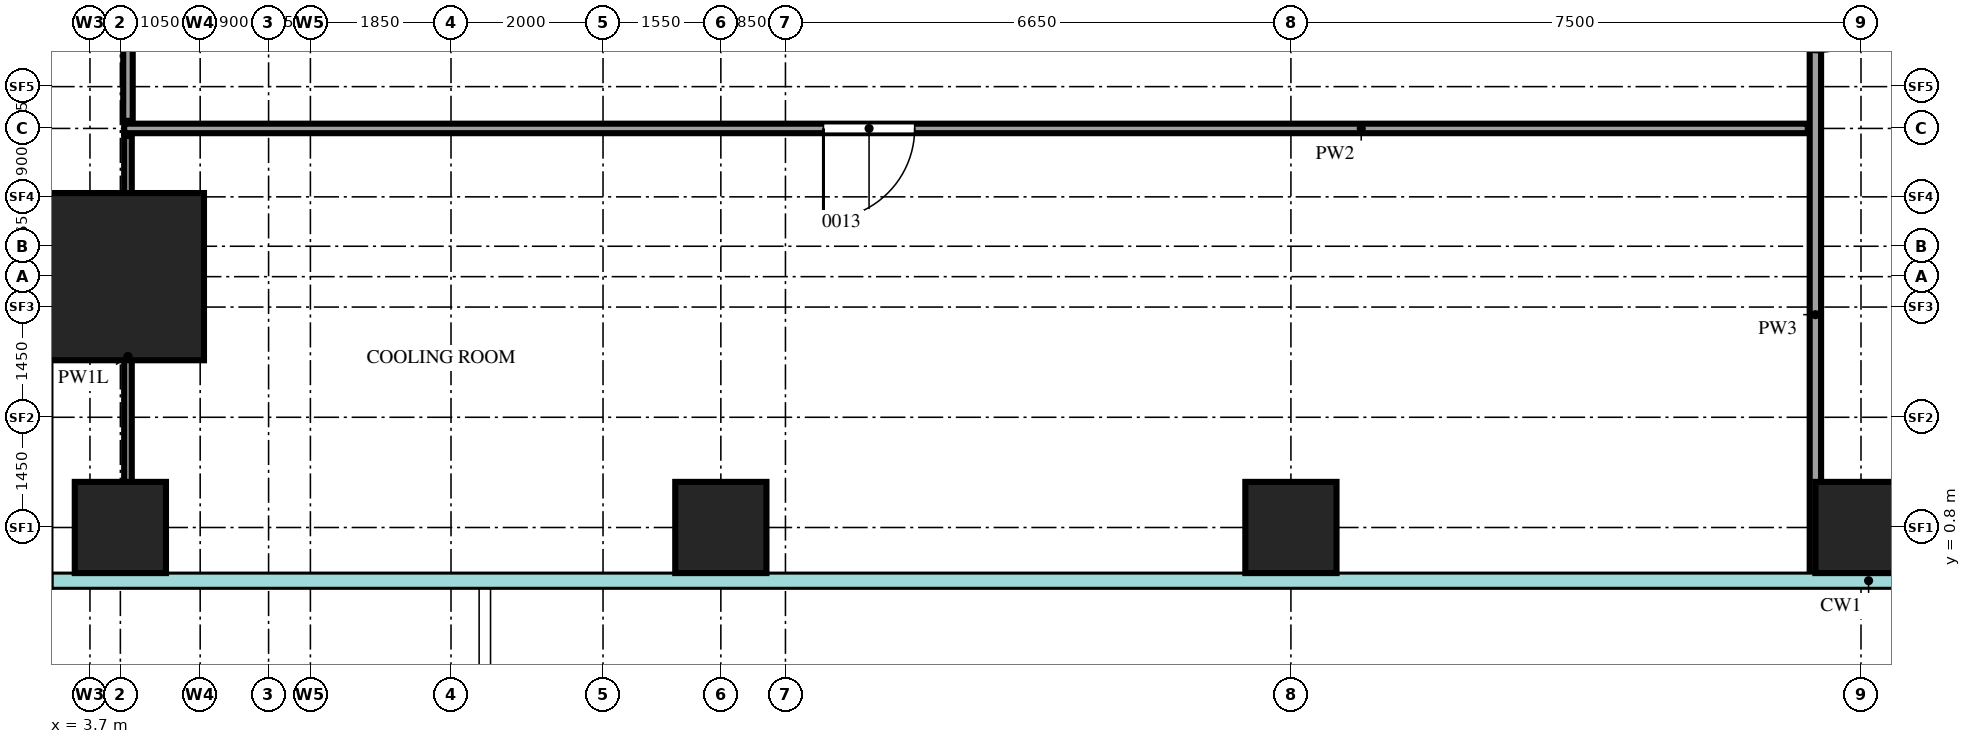
"""IFC4 building model, lengths in metres.
Left out: names, types, materials, properties, quantities, classifications, styles, units other than length and angle.
Written with IfcOpenShell. Run it as: python <this file> out.ifc"""

import sys

from ifc_helpers import new_model, si_unit, direction, frame, frame_2d, origin, origin_2d, place, context, subcontext, project, spatial, rectangle, extrude, source, transform, mapped, element, fill, save


model = new_model("IFC4")
c1 = context("Model", 3, precision=1e-05, world=origin(), true_north=direction((0.0, 1.0)))
c2 = subcontext(c1, "Body", "Model", "MODEL_VIEW")
j1 = project(units=[si_unit("LENGTHUNIT", "METRE"), si_unit("PLANEANGLEUNIT", "RADIAN")], contexts=[c1])
p1 = place(None, origin())
s1 = spatial("IfcSite", under=j1, at=p1, CompositionType="ELEMENT")
p2 = place(p1, origin())
s2 = spatial("IfcBuilding", under=s1, at=p2, CompositionType="ELEMENT")
p3 = place(p2, frame((0.0, 0.0, 78.0)))
s3 = spatial("IfcBuildingStorey", under=s2, at=p3, CompositionType="ELEMENT", Elevation=78.0)
m1 = source(origin(), c2, "Body", "SweptSolid", [
    extrude(rectangle(XDim=2.2, YDim=2.2, at=origin_2d()), origin(), (0.0, 0.0, 1.0), 4.5),
])
p4 = place(p3, frame((4.1, 4.1, 0.0), z_axis=(0.0, 0.0, 1.0), x_axis=(1.0, 0.0, 0.0)))
e1 = element("IfcColumn", 1, at=p4, inside=s3, PredefinedType="COLUMN", context=c2, shape_type="MappedRepresentation", body=[
    mapped(m1, transform((0.0, 0.0, 0.0))),
])
m2 = source(origin(), c2, "Body", "SweptSolid", [
    extrude(rectangle(XDim=1.2, YDim=1.2, at=origin_2d()), origin(), (0.0, 0.0, 1.0), 4.2),
])
for number, where, z_axis, x_axis in (
    (2, (4.1, 0.8, 0.0), (0.0, 0.0, 1.0), (1.0, 0.0, 0.0)),
    (3, (12.0, 0.8, 0.0), (0.0, 0.0, 1.0), (1.0, 0.0, 0.0)),
    (4, (19.5, 0.8, 0.0), (0.0, 0.0, 1.0), (1.0, 0.0, 0.0)),
    (5, (27.0, 0.8, 0.0), (0.0, 0.0, 1.0), (1.0, 0.0, 0.0)),
):
    element("IfcColumn", number, at=place(p3, frame(where, z_axis=z_axis, x_axis=x_axis)), inside=s3, PredefinedType="COLUMN", context=c2, shape_type="MappedRepresentation", body=[
        mapped(m2, transform((0.0, 0.0, 0.0))),
    ])
m3 = source(origin(), c2, "Body", "SweptSolid", [
    extrude(rectangle(XDim=5.8, YDim=0.1, at=frame_2d((2.9, 0.0))), origin(), (0.0, 0.0, 1.0), 3.6),
])
p5 = place(p3, frame((4.2, 0.15, 0.0), z_axis=(0.0, 0.0, 1.0), x_axis=(0.0, 1.0, 0.0)))
e6 = element("IfcWall", 6, at=p5, inside=s3, PredefinedType="PARTITIONING", context=c2, shape_type="MappedRepresentation", body=[
    mapped(m3, transform((0.0, 0.0, 0.0))),
])
m4 = source(origin(), c2, "Body", "SweptSolid", [
    extrude(rectangle(XDim=8.75, YDim=0.15, at=frame_2d((4.375, 0.0))), origin(), (0.0, 0.0, 1.0), 4.3),
])
p6 = place(p3, frame((26.4, 0.15, 0.0), z_axis=(0.0, 0.0, 1.0), x_axis=(0.0, 1.0, 0.0)))
e7 = element("IfcWall", 7, at=p6, inside=s3, PredefinedType="PARTITIONING", context=c2, shape_type="MappedRepresentation", body=[
    mapped(m4, transform((0.0, 0.0, 0.0))),
])
m5 = source(origin(), c2, "Body", "SweptSolid", [
    extrude(rectangle(XDim=1.2, YDim=2.1, at=frame_2d((0.6, 1.05))), frame((0.0, 0.085, 0.0), z_axis=(0.0, -1.0, 0.0), x_axis=(1.0, 0.0, 0.0)), (0.0, 0.0, 1.0), 0.17),
])
p7 = place(p6, frame((6.9, 0.0, 0.0)))
e8 = element("IfcOpeningElement", 8, at=p7, cuts=e7, PredefinedType="OPENING", context=c2, shape_type="MappedRepresentation", body=[
    mapped(m5, transform((0.0, 0.0, 0.0))),
])
m6 = source(origin(), c2, "Body", "SweptSolid", [
    extrude(rectangle(XDim=22.15, YDim=0.125, at=frame_2d((11.075, 0.0))), origin(), (0.0, 0.0, 1.0), 4.3),
])
p8 = place(p3, frame((4.15, 6.05, 0.0), z_axis=(0.0, 0.0, 1.0), x_axis=(1.0, 0.0, 0.0)))
e9 = element("IfcWall", 9, at=p8, inside=s3, PredefinedType="PARTITIONING", context=c2, shape_type="MappedRepresentation", body=[
    mapped(m6, transform((0.0, 0.0, 0.0))),
])
m7 = source(origin(), c2, "Body", "SweptSolid", [
    extrude(rectangle(XDim=1.2, YDim=2.1, at=frame_2d((0.6, 1.05))), frame((0.0, 0.073, 0.0), z_axis=(0.0, -1.0, 0.0), x_axis=(1.0, 0.0, 0.0)), (0.0, 0.0, 1.0), 0.145),
])
p9 = place(p8, frame((9.2, 0.0, 0.0)))
e10 = element("IfcOpeningElement", 10, at=p9, cuts=e9, PredefinedType="OPENING", context=c2, shape_type="MappedRepresentation", body=[
    mapped(m7, transform((0.0, 0.0, 0.0))),
])
m8 = source(origin(), c2, "Body", "SweptSolid", [
    extrude(rectangle(XDim=41.8, YDim=0.125, at=frame_2d((20.9, 0.0))), origin(), (0.0, 0.0, 1.0), 4.3),
])
p10 = place(p3, frame((4.2, 6.15, 0.0), z_axis=(0.0, 0.0, 1.0), x_axis=(0.0, 1.0, 0.0)))
e11 = element("IfcWall", 11, at=p10, inside=s3, PredefinedType="PARTITIONING", context=c2, shape_type="MappedRepresentation", body=[
    mapped(m8, transform((0.0, 0.0, 0.0))),
])
p11 = place(p10, frame((3.45, 0.0, 0.0)))
e12 = element("IfcOpeningElement", 12, at=p11, cuts=e11, PredefinedType="OPENING", context=c2, shape_type="MappedRepresentation", body=[
    mapped(m7, transform((0.0, 0.0, 0.0))),
])
m9 = source(origin(), c2, "Body", "SweptSolid", [
    extrude(rectangle(XDim=0.9, YDim=2.1, at=frame_2d((0.45, 1.05))), frame((0.0, 0.073, 0.0), z_axis=(0.0, -1.0, 0.0), x_axis=(1.0, 0.0, 0.0)), (0.0, 0.0, 1.0), 0.145),
])
p12 = place(p10, frame((13.25, 0.0, 0.0)))
e13 = element("IfcOpeningElement", 13, at=p12, cuts=e11, PredefinedType="OPENING", context=c2, shape_type="MappedRepresentation", body=[
    mapped(m9, transform((0.0, 0.0, 0.0))),
])
p13 = place(p10, frame((30.35, 0.0, 0.0)))
e14 = element("IfcOpeningElement", 14, at=p13, cuts=e11, PredefinedType="OPENING", context=c2, shape_type="MappedRepresentation", body=[
    mapped(m9, transform((0.0, 0.0, 0.0))),
])
m10 = source(origin(), c2, "Body", "SweptSolid", [
    extrude(rectangle(XDim=1.2, YDim=2.1, at=frame_2d((0.6, 1.05))), frame((0.0, 0.025, 0.0), z_axis=(0.0, -1.0, 0.0), x_axis=(1.0, 0.0, 0.0)), (0.0, 0.0, 1.0), 0.05),
])
p14 = place(p7, origin())
e15 = element("IfcDoor", 15, at=p14, inside=s3, OperationType="SINGLE_SWING_RIGHT", PredefinedType="DOOR", context=c2, shape_type="MappedRepresentation", body=[
    mapped(m10, transform((0.0, 0.0, 0.0))),
])
fill(e8, e15)
p15 = place(p9, origin())
e16 = element("IfcDoor", 16, at=p15, inside=s3, OperationType="SINGLE_SWING_LEFT", PredefinedType="DOOR", context=c2, shape_type="MappedRepresentation", body=[
    mapped(m10, transform((0.0, 0.0, 0.0))),
])
fill(e10, e16)
save(model, sys.argv[1])
